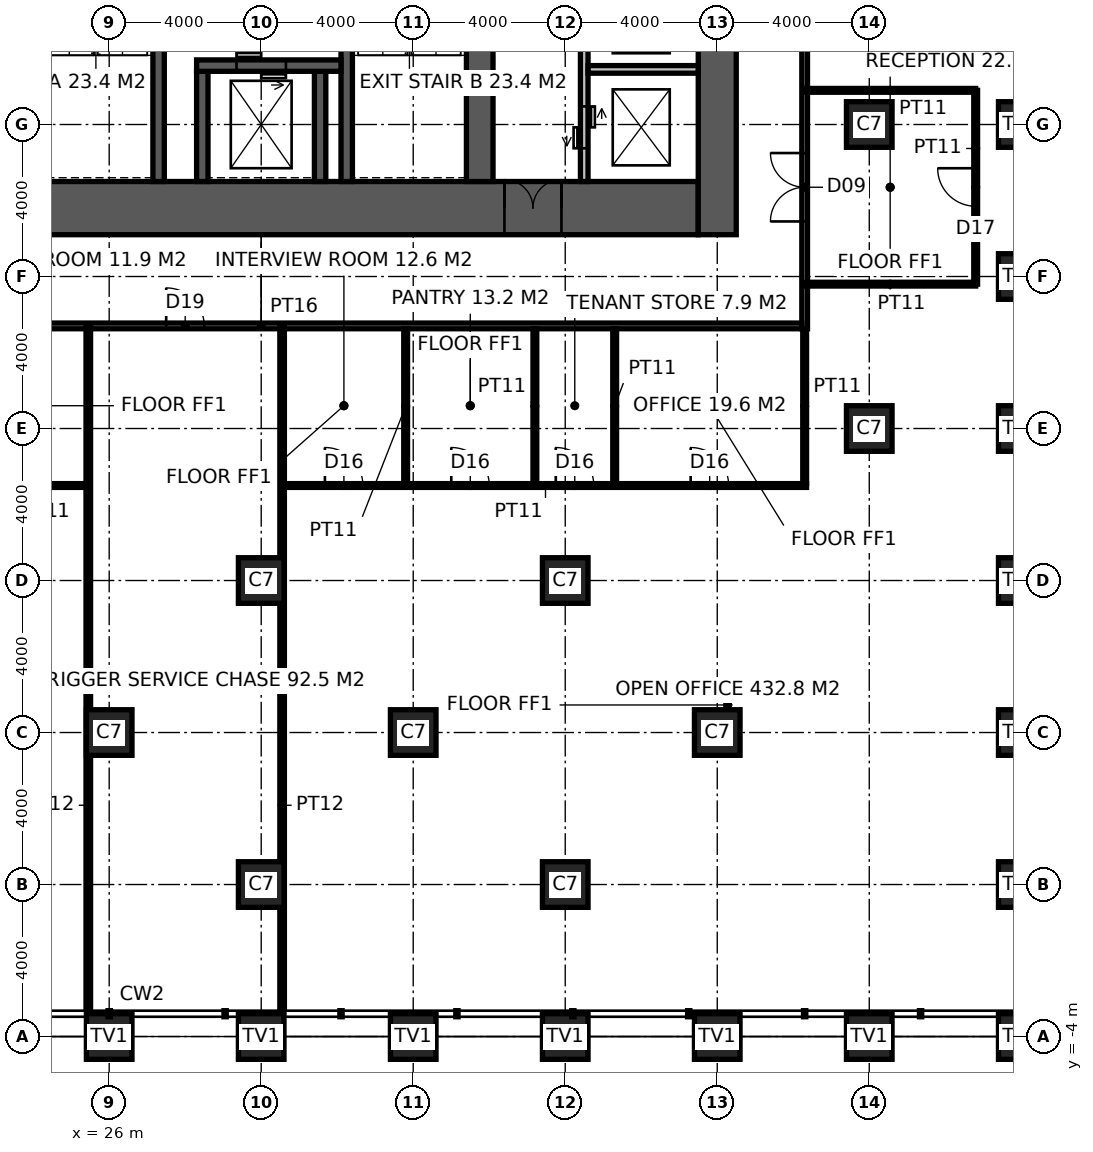
"""IFC4 building model, lengths in metres.
Left out: names, types, materials, properties, quantities, classifications, styles, units other than length and angle.
Written with IfcOpenShell. Run it as: python <this file> out.ifc"""

import sys

from ifc_helpers import new_model, si_unit, direction, frame, frame_2d, origin, origin_2d, place, context, subcontext, project, spatial, rectangle, hollow_rectangle, extrude, element, fill, save


model = new_model("IFC4")
c1 = context("Model", 3, precision=1e-05, world=origin(), true_north=direction((0.0, 1.0)))
c2 = subcontext(c1, "Body", "Model", "MODEL_VIEW")
j1 = project(units=[si_unit("LENGTHUNIT", "METRE"), si_unit("PLANEANGLEUNIT", "RADIAN")], contexts=[c1])
p1 = place(None, origin())
s1 = spatial("IfcSite", under=j1, at=p1, CompositionType="ELEMENT")
p2 = place(p1, origin())
s2 = spatial("IfcBuilding", under=s1, at=p2, CompositionType="ELEMENT")
p3 = place(p2, frame((0.0, 0.0, 11.0)))
s3 = spatial("IfcBuildingStorey", under=s2, at=p3, CompositionType="ELEMENT", Elevation=11.0)
for number, where, z_axis, x_axis in (
    (1, (26.0, -4.0, 0.0), (0.0, 0.0, 1.0), (1.0, 0.0, 0.0)),
    (2, (30.0, -4.0, 0.0), (0.0, 0.0, 1.0), (1.0, 0.0, 0.0)),
    (3, (34.0, -4.0, 0.0), (0.0, 0.0, 1.0), (1.0, 0.0, 0.0)),
    (4, (38.0, -4.0, 0.0), (0.0, 0.0, 1.0), (1.0, 0.0, 0.0)),
    (5, (42.0, -4.0, 0.0), (0.0, 0.0, 1.0), (1.0, 0.0, 0.0)),
    (6, (46.0, -4.0, 0.0), (0.0, 0.0, 1.0), (1.0, 0.0, 0.0)),
    (7, (50.0, -4.0, 0.0), (0.0, 0.0, 1.0), (1.0, 0.0, 0.0)),
    (8, (50.0, 0.0, 0.0), (0.0, 0.0, 1.0), (1.0, 0.0, 0.0)),
    (9, (50.0, 4.0, 0.0), (0.0, 0.0, 1.0), (1.0, 0.0, 0.0)),
    (10, (50.0, 8.0, 0.0), (0.0, 0.0, 1.0), (1.0, 0.0, 0.0)),
    (11, (50.0, 12.0, 0.0), (0.0, 0.0, 1.0), (1.0, 0.0, 0.0)),
    (12, (50.0, 16.0, 0.0), (0.0, 0.0, 1.0), (1.0, 0.0, 0.0)),
    (13, (50.0, 20.0, 0.0), (0.0, 0.0, 1.0), (1.0, 0.0, 0.0)),
):
    element("IfcColumn", number, at=place(p3, frame(where, z_axis=z_axis, x_axis=x_axis)), inside=s3, PredefinedType="USERDEFINED", context=c2, shape_type="SweptSolid", body=[
        extrude(hollow_rectangle(XDim=1.2, YDim=1.2, WallThickness=0.1, at=origin_2d()), origin(), (0.0, 0.0, 1.0), 4.0),
    ])
for number, where, z_axis, x_axis in (
    (14, (26.0, 4.0, 0.0), (0.0, 0.0, 1.0), (1.0, 0.0, 0.0)),
    (15, (30.0, 0.0, 0.0), (0.0, 0.0, 1.0), (1.0, 0.0, 0.0)),
    (16, (30.0, 8.0, 0.0), (0.0, 0.0, 1.0), (1.0, 0.0, 0.0)),
    (17, (34.0, 4.0, 0.0), (0.0, 0.0, 1.0), (1.0, 0.0, 0.0)),
    (18, (38.0, 0.0, 0.0), (0.0, 0.0, 1.0), (1.0, 0.0, 0.0)),
    (19, (38.0, 8.0, 0.0), (0.0, 0.0, 1.0), (1.0, 0.0, 0.0)),
    (20, (42.0, 4.0, 0.0), (0.0, 0.0, 1.0), (1.0, 0.0, 0.0)),
    (21, (46.0, 12.0, 0.0), (0.0, 0.0, 1.0), (1.0, 0.0, 0.0)),
    (22, (46.0, 20.0, 0.0), (0.0, 0.0, 1.0), (1.0, 0.0, 0.0)),
):
    element("IfcColumn", number, at=place(p3, frame(where, z_axis=z_axis, x_axis=x_axis)), inside=s3, PredefinedType="COLUMN", context=c2, shape_type="SweptSolid", body=[
        extrude(hollow_rectangle(XDim=1.2, YDim=1.2, WallThickness=0.1, at=origin_2d()), origin(), (0.0, 0.0, 1.0), 4.0),
    ])
p4 = place(p3, frame((18.5, 17.8, -0.15), z_axis=(0.0, 0.0, 1.0), x_axis=(1.0, 0.0, 0.0)))
e23 = element("IfcWall", 23, at=p4, inside=s3, PredefinedType="SHEAR", context=c2, shape_type="SweptSolid", body=[
    extrude(rectangle(XDim=23.0, YDim=1.4, at=frame_2d((11.5, 0.0))), origin(), (0.0, 0.0, 1.0), 4.0),
])
p5 = place(p4, frame((3.45, 0.0, 0.15)))
e24 = element("IfcOpeningElement", 24, at=p5, cuts=e23, PredefinedType="OPENING", context=c2, shape_type="SweptSolid", body=[
    extrude(rectangle(XDim=1.5, YDim=2.4, at=frame_2d((0.75, 1.2))), frame((0.0, 0.71, 0.0), z_axis=(0.0, -1.0, 0.0), x_axis=(1.0, 0.0, 0.0)), (0.0, 0.0, 1.0), 1.42),
])
p6 = place(p4, frame((17.9, 0.0, 0.15)))
e25 = element("IfcOpeningElement", 25, at=p6, cuts=e23, PredefinedType="OPENING", context=c2, shape_type="SweptSolid", body=[
    extrude(rectangle(XDim=1.5, YDim=2.4, at=frame_2d((0.75, 1.2))), frame((0.0, 0.71, 0.0), z_axis=(0.0, -1.0, 0.0), x_axis=(1.0, 0.0, 0.0)), (0.0, 0.0, 1.0), 1.42),
])
p7 = place(p4, frame((0.9, 0.0, 0.15)))
e26 = element("IfcOpeningElement", 26, at=p7, cuts=e23, PredefinedType="OPENING", context=c2, shape_type="SweptSolid", body=[
    extrude(rectangle(XDim=1.0, YDim=2.2, at=frame_2d((0.5, 1.1))), frame((0.0, 0.71, 0.0), z_axis=(0.0, -1.0, 0.0), x_axis=(1.0, 0.0, 0.0)), (0.0, 0.0, 1.0), 1.42),
])
p8 = place(p3, frame((42.0, 17.1, -0.15), z_axis=(0.0, 0.0, 1.0), x_axis=(0.0, 1.0, 0.0)))
e27 = element("IfcWall", 27, at=p8, inside=s3, PredefinedType="SHEAR", context=c2, shape_type="SweptSolid", body=[
    extrude(rectangle(XDim=19.8, YDim=1.0, at=frame_2d((9.9, 0.0))), origin(), (0.0, 0.0, 1.0), 4.0),
])
p9 = place(p3, frame((35.75, 18.5, -0.15), z_axis=(0.0, 0.0, 1.0), x_axis=(0.0, 1.0, 0.0)))
e28 = element("IfcWall", 28, at=p9, inside=s3, PredefinedType="SHEAR", context=c2, shape_type="SweptSolid", body=[
    extrude(rectangle(XDim=17.0, YDim=0.7, at=frame_2d((8.5, 0.0))), origin(), (0.0, 0.0, 1.0), 4.0),
])
p10 = place(p9, frame((9.85, 0.0, 0.15)))
e29 = element("IfcOpeningElement", 29, at=p10, cuts=e28, PredefinedType="OPENING", context=c2, shape_type="SweptSolid", body=[
    extrude(rectangle(XDim=1.0, YDim=2.2, at=frame_2d((0.5, 1.1))), frame((0.0, 0.36, 0.0), z_axis=(0.0, -1.0, 0.0), x_axis=(1.0, 0.0, 0.0)), (0.0, 0.0, 1.0), 0.72),
])
p11 = place(p3, frame((27.3, 18.5, -0.15), z_axis=(0.0, 0.0, 1.0), x_axis=(0.0, 1.0, 0.0)))
e30 = element("IfcWall", 30, at=p11, inside=s3, PredefinedType="SHEAR", context=c2, shape_type="SweptSolid", body=[
    extrude(rectangle(XDim=7.9, YDim=0.3, at=frame_2d((3.95, 0.0))), origin(), (0.0, 0.0, 1.0), 4.0),
])
p12 = place(p11, frame((6.4, 0.0, 0.15)))
e31 = element("IfcOpeningElement", 31, at=p12, cuts=e30, PredefinedType="OPENING", context=c2, shape_type="SweptSolid", body=[
    extrude(rectangle(XDim=1.0, YDim=2.2, at=frame_2d((0.5, 1.1))), frame((0.0, 0.16, 0.0), z_axis=(0.0, -1.0, 0.0), x_axis=(1.0, 0.0, 0.0)), (0.0, 0.0, 1.0), 0.32),
])
p13 = place(p3, frame((32.25, 18.5, -0.15), z_axis=(0.0, 0.0, 1.0), x_axis=(0.0, 1.0, 0.0)))
e32 = element("IfcWall", 32, at=p13, inside=s3, PredefinedType="SHEAR", context=c2, shape_type="SweptSolid", body=[
    extrude(rectangle(XDim=7.9, YDim=0.3, at=frame_2d((3.95, 0.0))), origin(), (0.0, 0.0, 1.0), 4.0),
])
for number, where, z_axis, x_axis in (
    (33, (28.45, 18.5, -0.15), (0.0, 0.0, 1.0), (0.0, 1.0, 0.0)),
    (34, (31.55, 18.5, -0.15), (0.0, 0.0, 1.0), (0.0, 1.0, 0.0)),
):
    element("IfcWall", number, at=place(p3, frame(where, z_axis=z_axis, x_axis=x_axis)), inside=s3, PredefinedType="SHEAR", context=c2, shape_type="SweptSolid", body=[
        extrude(rectangle(XDim=2.9, YDim=0.3, at=frame_2d((1.45, 0.0))), origin(), (0.0, 0.0, 1.0), 4.0),
    ])
p14 = place(p3, frame((28.3, 21.55, -0.15), z_axis=(0.0, 0.0, 1.0), x_axis=(1.0, 0.0, 0.0)))
e35 = element("IfcWall", 35, at=p14, inside=s3, PredefinedType="SHEAR", context=c2, shape_type="SweptSolid", body=[
    extrude(rectangle(XDim=3.8, YDim=0.3, at=frame_2d((1.9, 0.0))), origin(), (0.0, 0.0, 1.0), 4.0),
])
p15 = place(p14, frame((1.05, 0.0, 0.15)))
e36 = element("IfcOpeningElement", 36, at=p15, cuts=e35, PredefinedType="OPENING", context=c2, shape_type="SweptSolid", body=[
    extrude(rectangle(XDim=1.3, YDim=2.4, at=frame_2d((0.65, 1.2))), frame((0.0, 0.16, 0.0), z_axis=(0.0, -1.0, 0.0), x_axis=(1.0, 0.0, 0.0)), (0.0, 0.0, 1.0), 0.32),
])
p16 = place(p3, frame((38.5, 18.5, -0.15), z_axis=(0.0, 0.0, 1.0), x_axis=(0.0, 1.0, 0.0)))
e37 = element("IfcWall", 37, at=p16, inside=s3, PredefinedType="SOLIDWALL", context=c2, shape_type="SweptSolid", body=[
    extrude(rectangle(XDim=11.5, YDim=0.2, at=frame_2d((5.75, 0.0))), origin(), (0.0, 0.0, 1.0), 4.0),
])
p17 = place(p16, frame((0.875, 0.0, 0.15)))
e38 = element("IfcOpeningElement", 38, at=p17, cuts=e37, PredefinedType="OPENING", context=c2, shape_type="SweptSolid", body=[
    extrude(rectangle(XDim=1.1, YDim=2.2, at=frame_2d((0.55, 1.1))), frame((0.0, 0.11, 0.0), z_axis=(0.0, -1.0, 0.0), x_axis=(1.0, 0.0, 0.0)), (0.0, 0.0, 1.0), 0.22),
])
p18 = place(p16, frame((3.825, 0.0, 0.15)))
e39 = element("IfcOpeningElement", 39, at=p18, cuts=e37, PredefinedType="OPENING", context=c2, shape_type="SweptSolid", body=[
    extrude(rectangle(XDim=1.1, YDim=2.2, at=frame_2d((0.55, 1.1))), frame((0.0, 0.11, 0.0), z_axis=(0.0, -1.0, 0.0), x_axis=(1.0, 0.0, 0.0)), (0.0, 0.0, 1.0), 0.22),
])
p19 = place(p16, frame((6.675, 0.0, 0.15)))
e40 = element("IfcOpeningElement", 40, at=p19, cuts=e37, PredefinedType="OPENING", context=c2, shape_type="SweptSolid", body=[
    extrude(rectangle(XDim=1.1, YDim=2.2, at=frame_2d((0.55, 1.1))), frame((0.0, 0.11, 0.0), z_axis=(0.0, -1.0, 0.0), x_axis=(1.0, 0.0, 0.0)), (0.0, 0.0, 1.0), 0.22),
])
p20 = place(p16, frame((9.575, 0.0, 0.15)))
e41 = element("IfcOpeningElement", 41, at=p20, cuts=e37, PredefinedType="OPENING", context=c2, shape_type="SweptSolid", body=[
    extrude(rectangle(XDim=1.1, YDim=2.2, at=frame_2d((0.55, 1.1))), frame((0.0, 0.11, 0.0), z_axis=(0.0, -1.0, 0.0), x_axis=(1.0, 0.0, 0.0)), (0.0, 0.0, 1.0), 0.22),
])
p21 = place(p3, frame((38.6, 21.45, -0.15), z_axis=(0.0, 0.0, 1.0), x_axis=(1.0, 0.0, 0.0)))
e42 = element("IfcWall", 42, at=p21, inside=s3, PredefinedType="SOLIDWALL", context=c2, shape_type="SweptSolid", body=[
    extrude(rectangle(XDim=2.9, YDim=0.2, at=frame_2d((1.45, 0.0))), origin(), (0.0, 0.0, 1.0), 4.0),
])
p22 = place(p3, frame((44.3, 14.625, 0.0), z_axis=(0.0, 0.0, 1.0), x_axis=(0.0, 1.0, 0.0)))
e43 = element("IfcWall", 43, at=p22, inside=s3, PredefinedType="PARTITIONING", context=c2, shape_type="SweptSolid", body=[
    extrude(rectangle(XDim=24.15, YDim=0.15, at=frame_2d((12.075, 0.0))), origin(), (0.0, 0.0, 1.0), 3.85),
])
p23 = place(p22, frame((2.824, 0.0, 0.0)))
e44 = element("IfcOpeningElement", 44, at=p23, cuts=e43, PredefinedType="OPENING", context=c2, shape_type="SweptSolid", body=[
    extrude(rectangle(XDim=1.8, YDim=2.4, at=frame_2d((0.9, 1.2))), frame((0.0, 0.085, 0.0), z_axis=(0.0, -1.0, 0.0), x_axis=(1.0, 0.0, 0.0)), (0.0, 0.0, 1.0), 0.17),
])
p24 = place(p22, frame((18.075, 0.0, 0.0)))
e45 = element("IfcOpeningElement", 45, at=p24, cuts=e43, PredefinedType="OPENING", context=c2, shape_type="SweptSolid", body=[
    extrude(rectangle(XDim=1.8, YDim=2.4, at=frame_2d((0.9, 1.2))), frame((0.0, 0.085, 0.0), z_axis=(0.0, -1.0, 0.0), x_axis=(1.0, 0.0, 0.0)), (0.0, 0.0, 1.0), 0.17),
])
p25 = place(p22, frame((10.875, 0.0, 0.0)))
e46 = element("IfcOpeningElement", 46, at=p25, cuts=e43, PredefinedType="OPENING", context=c2, shape_type="SweptSolid", body=[
    extrude(rectangle(XDim=1.0, YDim=2.2, at=frame_2d((0.5, 1.1))), frame((0.0, 0.085, 0.0), z_axis=(0.0, -1.0, 0.0), x_axis=(1.0, 0.0, 0.0)), (0.0, 0.0, 1.0), 0.17),
])
p26 = place(p3, frame((15.775, 14.7, 0.0), z_axis=(0.0, 0.0, 1.0), x_axis=(1.0, 0.0, 0.0)))
e47 = element("IfcWall", 47, at=p26, inside=s3, PredefinedType="PARTITIONING", context=c2, shape_type="SweptSolid", body=[
    extrude(rectangle(XDim=28.45, YDim=0.15, at=frame_2d((14.225, 0.0))), origin(), (0.0, 0.0, 1.0), 3.85),
])
p27 = place(p26, frame((11.725, 0.0, 0.0)))
e48 = element("IfcOpeningElement", 48, at=p27, cuts=e47, PredefinedType="OPENING", context=c2, shape_type="SweptSolid", body=[
    extrude(rectangle(XDim=1.0, YDim=2.2, at=frame_2d((0.5, 1.1))), frame((0.0, 0.085, 0.0), z_axis=(0.0, -1.0, 0.0), x_axis=(1.0, 0.0, 0.0)), (0.0, 0.0, 1.0), 0.17),
])
for number, where, z_axis, x_axis in (
    (49, (25.45, -3.32, 0.0), (0.0, 0.0, 1.0), (0.0, 1.0, 0.0)),
    (50, (30.55, -3.32, 0.0), (0.0, 0.0, 1.0), (0.0, 1.0, 0.0)),
):
    element("IfcWall", number, at=place(p3, frame(where, z_axis=z_axis, x_axis=x_axis)), inside=s3, PredefinedType="PARTITIONING", context=c2, shape_type="SweptSolid", body=[
        extrude(rectangle(XDim=18.02, YDim=0.12, at=frame_2d((9.01, 0.0))), origin(), (0.0, 0.0, 1.0), 2.65),
    ])
p28 = place(p3, frame((15.65, 10.5, 0.0), z_axis=(0.0, 0.0, 1.0), x_axis=(1.0, 0.0, 0.0)))
e51 = element("IfcWall", 51, at=p28, inside=s3, PredefinedType="PARTITIONING", context=c2, shape_type="SweptSolid", body=[
    extrude(rectangle(XDim=9.739, YDim=0.1, at=frame_2d((4.87, 0.0))), origin(), (0.0, 0.0, 1.0), 3.85),
])
p29 = place(p28, frame((1.175, 0.0, 0.0)))
e52 = element("IfcOpeningElement", 52, at=p29, cuts=e51, PredefinedType="OPENING", context=c2, shape_type="SweptSolid", body=[
    extrude(rectangle(XDim=1.0, YDim=2.2, at=frame_2d((0.5, 1.1))), frame((0.0, 0.06, 0.0), z_axis=(0.0, -1.0, 0.0), x_axis=(1.0, 0.0, 0.0)), (0.0, 0.0, 1.0), 0.12),
])
p30 = place(p28, frame((4.5, 0.0, 0.0)))
e53 = element("IfcOpeningElement", 53, at=p30, cuts=e51, PredefinedType="OPENING", context=c2, shape_type="SweptSolid", body=[
    extrude(rectangle(XDim=1.0, YDim=2.2, at=frame_2d((0.5, 1.1))), frame((0.0, 0.06, 0.0), z_axis=(0.0, -1.0, 0.0), x_axis=(1.0, 0.0, 0.0)), (0.0, 0.0, 1.0), 0.12),
])
p31 = place(p28, frame((7.75, 0.0, 0.0)))
e54 = element("IfcOpeningElement", 54, at=p31, cuts=e51, PredefinedType="OPENING", context=c2, shape_type="SweptSolid", body=[
    extrude(rectangle(XDim=1.0, YDim=2.2, at=frame_2d((0.5, 1.1))), frame((0.0, 0.06, 0.0), z_axis=(0.0, -1.0, 0.0), x_axis=(1.0, 0.0, 0.0)), (0.0, 0.0, 1.0), 0.12),
])
p32 = place(p3, frame((30.611, 10.5, 0.0), z_axis=(0.0, 0.0, 1.0), x_axis=(1.0, 0.0, 0.0)))
e55 = element("IfcWall", 55, at=p32, inside=s3, PredefinedType="PARTITIONING", context=c2, shape_type="SweptSolid", body=[
    extrude(rectangle(XDim=13.739, YDim=0.1, at=frame_2d((6.87, 0.0))), origin(), (0.0, 0.0, 1.0), 3.85),
])
p33 = place(p32, frame((1.065, 0.0, 0.0)))
e56 = element("IfcOpeningElement", 56, at=p33, cuts=e55, PredefinedType="OPENING", context=c2, shape_type="SweptSolid", body=[
    extrude(rectangle(XDim=1.0, YDim=2.2, at=frame_2d((0.5, 1.1))), frame((0.0, 0.06, 0.0), z_axis=(0.0, -1.0, 0.0), x_axis=(1.0, 0.0, 0.0)), (0.0, 0.0, 1.0), 0.12),
])
p34 = place(p32, frame((4.39, 0.0, 0.0)))
e57 = element("IfcOpeningElement", 57, at=p34, cuts=e55, PredefinedType="OPENING", context=c2, shape_type="SweptSolid", body=[
    extrude(rectangle(XDim=1.0, YDim=2.2, at=frame_2d((0.5, 1.1))), frame((0.0, 0.06, 0.0), z_axis=(0.0, -1.0, 0.0), x_axis=(1.0, 0.0, 0.0)), (0.0, 0.0, 1.0), 0.12),
])
p35 = place(p32, frame((7.14, 0.0, 0.0)))
e58 = element("IfcOpeningElement", 58, at=p35, cuts=e55, PredefinedType="OPENING", context=c2, shape_type="SweptSolid", body=[
    extrude(rectangle(XDim=1.0, YDim=2.2, at=frame_2d((0.5, 1.1))), frame((0.0, 0.06, 0.0), z_axis=(0.0, -1.0, 0.0), x_axis=(1.0, 0.0, 0.0)), (0.0, 0.0, 1.0), 0.12),
])
p36 = place(p32, frame((10.689, 0.0, 0.0)))
e59 = element("IfcOpeningElement", 59, at=p36, cuts=e55, PredefinedType="OPENING", context=c2, shape_type="SweptSolid", body=[
    extrude(rectangle(XDim=1.0, YDim=2.2, at=frame_2d((0.5, 1.1))), frame((0.0, 0.06, 0.0), z_axis=(0.0, -1.0, 0.0), x_axis=(1.0, 0.0, 0.0)), (0.0, 0.0, 1.0), 0.12),
])
for number, where, z_axis, x_axis in (
    (60, (33.801, 10.55, 0.0), (0.0, 0.0, 1.0), (0.0, 1.0, 0.0)),
    (61, (37.201, 10.55, 0.0), (0.0, 0.0, 1.0), (0.0, 1.0, 0.0)),
    (62, (39.301, 10.55, 0.0), (0.0, 0.0, 1.0), (0.0, 1.0, 0.0)),
    (63, (44.3, 10.55, 0.0), (0.0, 0.0, 1.0), (0.0, 1.0, 0.0)),
):
    element("IfcWall", number, at=place(p3, frame(where, z_axis=z_axis, x_axis=x_axis)), inside=s3, PredefinedType="PARTITIONING", context=c2, shape_type="SweptSolid", body=[
        extrude(rectangle(XDim=4.075, YDim=0.1, at=frame_2d((2.038, 0.0))), origin(), (0.0, 0.0, 1.0), 3.85),
    ])
p37 = place(p3, frame((44.3, 15.799, 0.0), z_axis=(0.0, 0.0, 1.0), x_axis=(1.0, 0.0, 0.0)))
e64 = element("IfcWall", 64, at=p37, inside=s3, PredefinedType="PARTITIONING", context=c2, shape_type="SweptSolid", body=[
    extrude(rectangle(XDim=4.5, YDim=0.1, at=frame_2d((2.25, 0.0))), origin(), (0.0, 0.0, 1.0), 3.85),
])
p38 = place(p3, frame((48.8, 15.799, 0.0), z_axis=(0.0, 0.0, 1.0), x_axis=(0.0, 1.0, 0.0)))
e65 = element("IfcWall", 65, at=p38, inside=s3, PredefinedType="PARTITIONING", context=c2, shape_type="SweptSolid", body=[
    extrude(rectangle(XDim=5.1, YDim=0.1, at=frame_2d((2.55, 0.0))), origin(), (0.0, 0.0, 1.0), 3.85),
])
p39 = place(p38, frame((2.05, 0.0, 0.0)))
e66 = element("IfcOpeningElement", 66, at=p39, cuts=e65, PredefinedType="OPENING", context=c2, shape_type="SweptSolid", body=[
    extrude(rectangle(XDim=1.0, YDim=2.2, at=frame_2d((0.5, 1.1))), frame((0.0, 0.06, 0.0), z_axis=(0.0, -1.0, 0.0), x_axis=(1.0, 0.0, 0.0)), (0.0, 0.0, 1.0), 0.12),
])
p40 = place(p3, frame((48.8, 20.899, 0.0), z_axis=(0.0, 0.0, 1.0), x_axis=(-1.0, 0.0, 0.0)))
e67 = element("IfcWall", 67, at=p40, inside=s3, PredefinedType="PARTITIONING", context=c2, shape_type="SweptSolid", body=[
    extrude(rectangle(XDim=4.5, YDim=0.1, at=frame_2d((2.25, 0.0))), origin(), (0.0, 0.0, 1.0), 3.85),
])
p41 = place(p6, origin())
e68 = element("IfcDoor", 68, at=p41, inside=s3, OperationType="DOUBLE_DOOR_DOUBLE_SWING", PredefinedType="DOOR", context=c2, shape_type="SweptSolid", body=[
    extrude(rectangle(XDim=1.5, YDim=2.4, at=frame_2d((0.75, 1.2))), frame((0.0, 0.025, 0.0), z_axis=(0.0, -1.0, 0.0), x_axis=(1.0, 0.0, 0.0)), (0.0, 0.0, 1.0), 0.05),
])
fill(e25, e68)
p42 = place(p23, origin())
e69 = element("IfcDoor", 69, at=p42, inside=s3, OperationType="DOUBLE_DOOR_DOUBLE_SWING", PredefinedType="DOOR", context=c2, shape_type="SweptSolid", body=[
    extrude(rectangle(XDim=1.8, YDim=2.4, at=frame_2d((0.9, 1.2))), frame((0.0, 0.025, 0.0), z_axis=(0.0, -1.0, 0.0), x_axis=(1.0, 0.0, 0.0)), (0.0, 0.0, 1.0), 0.05),
])
fill(e44, e69)
p43 = place(p27, origin())
e70 = element("IfcDoor", 70, at=p43, inside=s3, OperationType="SINGLE_SWING_LEFT", PredefinedType="DOOR", context=c2, shape_type="SweptSolid", body=[
    extrude(rectangle(XDim=1.0, YDim=2.2, at=frame_2d((0.5, 1.1))), frame((0.0, 0.025, 0.0), z_axis=(0.0, -1.0, 0.0), x_axis=(1.0, 0.0, 0.0)), (0.0, 0.0, 1.0), 0.05),
])
fill(e48, e70)
p44 = place(p33, origin())
e71 = element("IfcDoor", 71, at=p44, inside=s3, OperationType="SINGLE_SWING_LEFT", PredefinedType="DOOR", context=c2, shape_type="SweptSolid", body=[
    extrude(rectangle(XDim=1.0, YDim=2.2, at=frame_2d((0.5, 1.1))), frame((0.0, 0.025, 0.0), z_axis=(0.0, -1.0, 0.0), x_axis=(1.0, 0.0, 0.0)), (0.0, 0.0, 1.0), 0.05),
])
fill(e56, e71)
p45 = place(p34, origin())
e72 = element("IfcDoor", 72, at=p45, inside=s3, OperationType="SINGLE_SWING_LEFT", PredefinedType="DOOR", context=c2, shape_type="SweptSolid", body=[
    extrude(rectangle(XDim=1.0, YDim=2.2, at=frame_2d((0.5, 1.1))), frame((0.0, 0.025, 0.0), z_axis=(0.0, -1.0, 0.0), x_axis=(1.0, 0.0, 0.0)), (0.0, 0.0, 1.0), 0.05),
])
fill(e57, e72)
p46 = place(p35, origin())
e73 = element("IfcDoor", 73, at=p46, inside=s3, OperationType="SINGLE_SWING_LEFT", PredefinedType="DOOR", context=c2, shape_type="SweptSolid", body=[
    extrude(rectangle(XDim=1.0, YDim=2.2, at=frame_2d((0.5, 1.1))), frame((0.0, 0.025, 0.0), z_axis=(0.0, -1.0, 0.0), x_axis=(1.0, 0.0, 0.0)), (0.0, 0.0, 1.0), 0.05),
])
fill(e58, e73)
p47 = place(p36, origin())
e74 = element("IfcDoor", 74, at=p47, inside=s3, OperationType="SINGLE_SWING_LEFT", PredefinedType="DOOR", context=c2, shape_type="SweptSolid", body=[
    extrude(rectangle(XDim=1.0, YDim=2.2, at=frame_2d((0.5, 1.1))), frame((0.0, 0.025, 0.0), z_axis=(0.0, -1.0, 0.0), x_axis=(1.0, 0.0, 0.0)), (0.0, 0.0, 1.0), 0.05),
])
fill(e59, e74)
p48 = place(p39, origin())
e75 = element("IfcDoor", 75, at=p48, inside=s3, OperationType="SINGLE_SWING_RIGHT", PredefinedType="DOOR", context=c2, shape_type="SweptSolid", body=[
    extrude(rectangle(XDim=1.0, YDim=2.2, at=frame_2d((0.5, 1.1))), frame((0.0, 0.025, 0.0), z_axis=(0.0, -1.0, 0.0), x_axis=(1.0, 0.0, 0.0)), (0.0, 0.0, 1.0), 0.05),
])
fill(e66, e75)
p49 = place(p15, origin())
e76 = element("IfcDoor", 76, at=p49, inside=s3, OperationType="DOUBLE_DOOR_SLIDING", PredefinedType="DOOR", context=c2, shape_type="SweptSolid", body=[
    extrude(rectangle(XDim=1.3, YDim=2.4, at=frame_2d((0.65, 1.2))), frame((0.0, 0.025, 0.0), z_axis=(0.0, -1.0, 0.0), x_axis=(1.0, 0.0, 0.0)), (0.0, 0.0, 1.0), 0.05),
])
fill(e36, e76)
p50 = place(p17, origin())
e77 = element("IfcDoor", 77, at=p50, inside=s3, OperationType="DOUBLE_DOOR_SLIDING", PredefinedType="DOOR", context=c2, shape_type="SweptSolid", body=[
    extrude(rectangle(XDim=1.1, YDim=2.2, at=frame_2d((0.55, 1.1))), frame((0.0, 0.025, 0.0), z_axis=(0.0, -1.0, 0.0), x_axis=(1.0, 0.0, 0.0)), (0.0, 0.0, 1.0), 0.05),
])
fill(e38, e77)
save(model, sys.argv[1])
